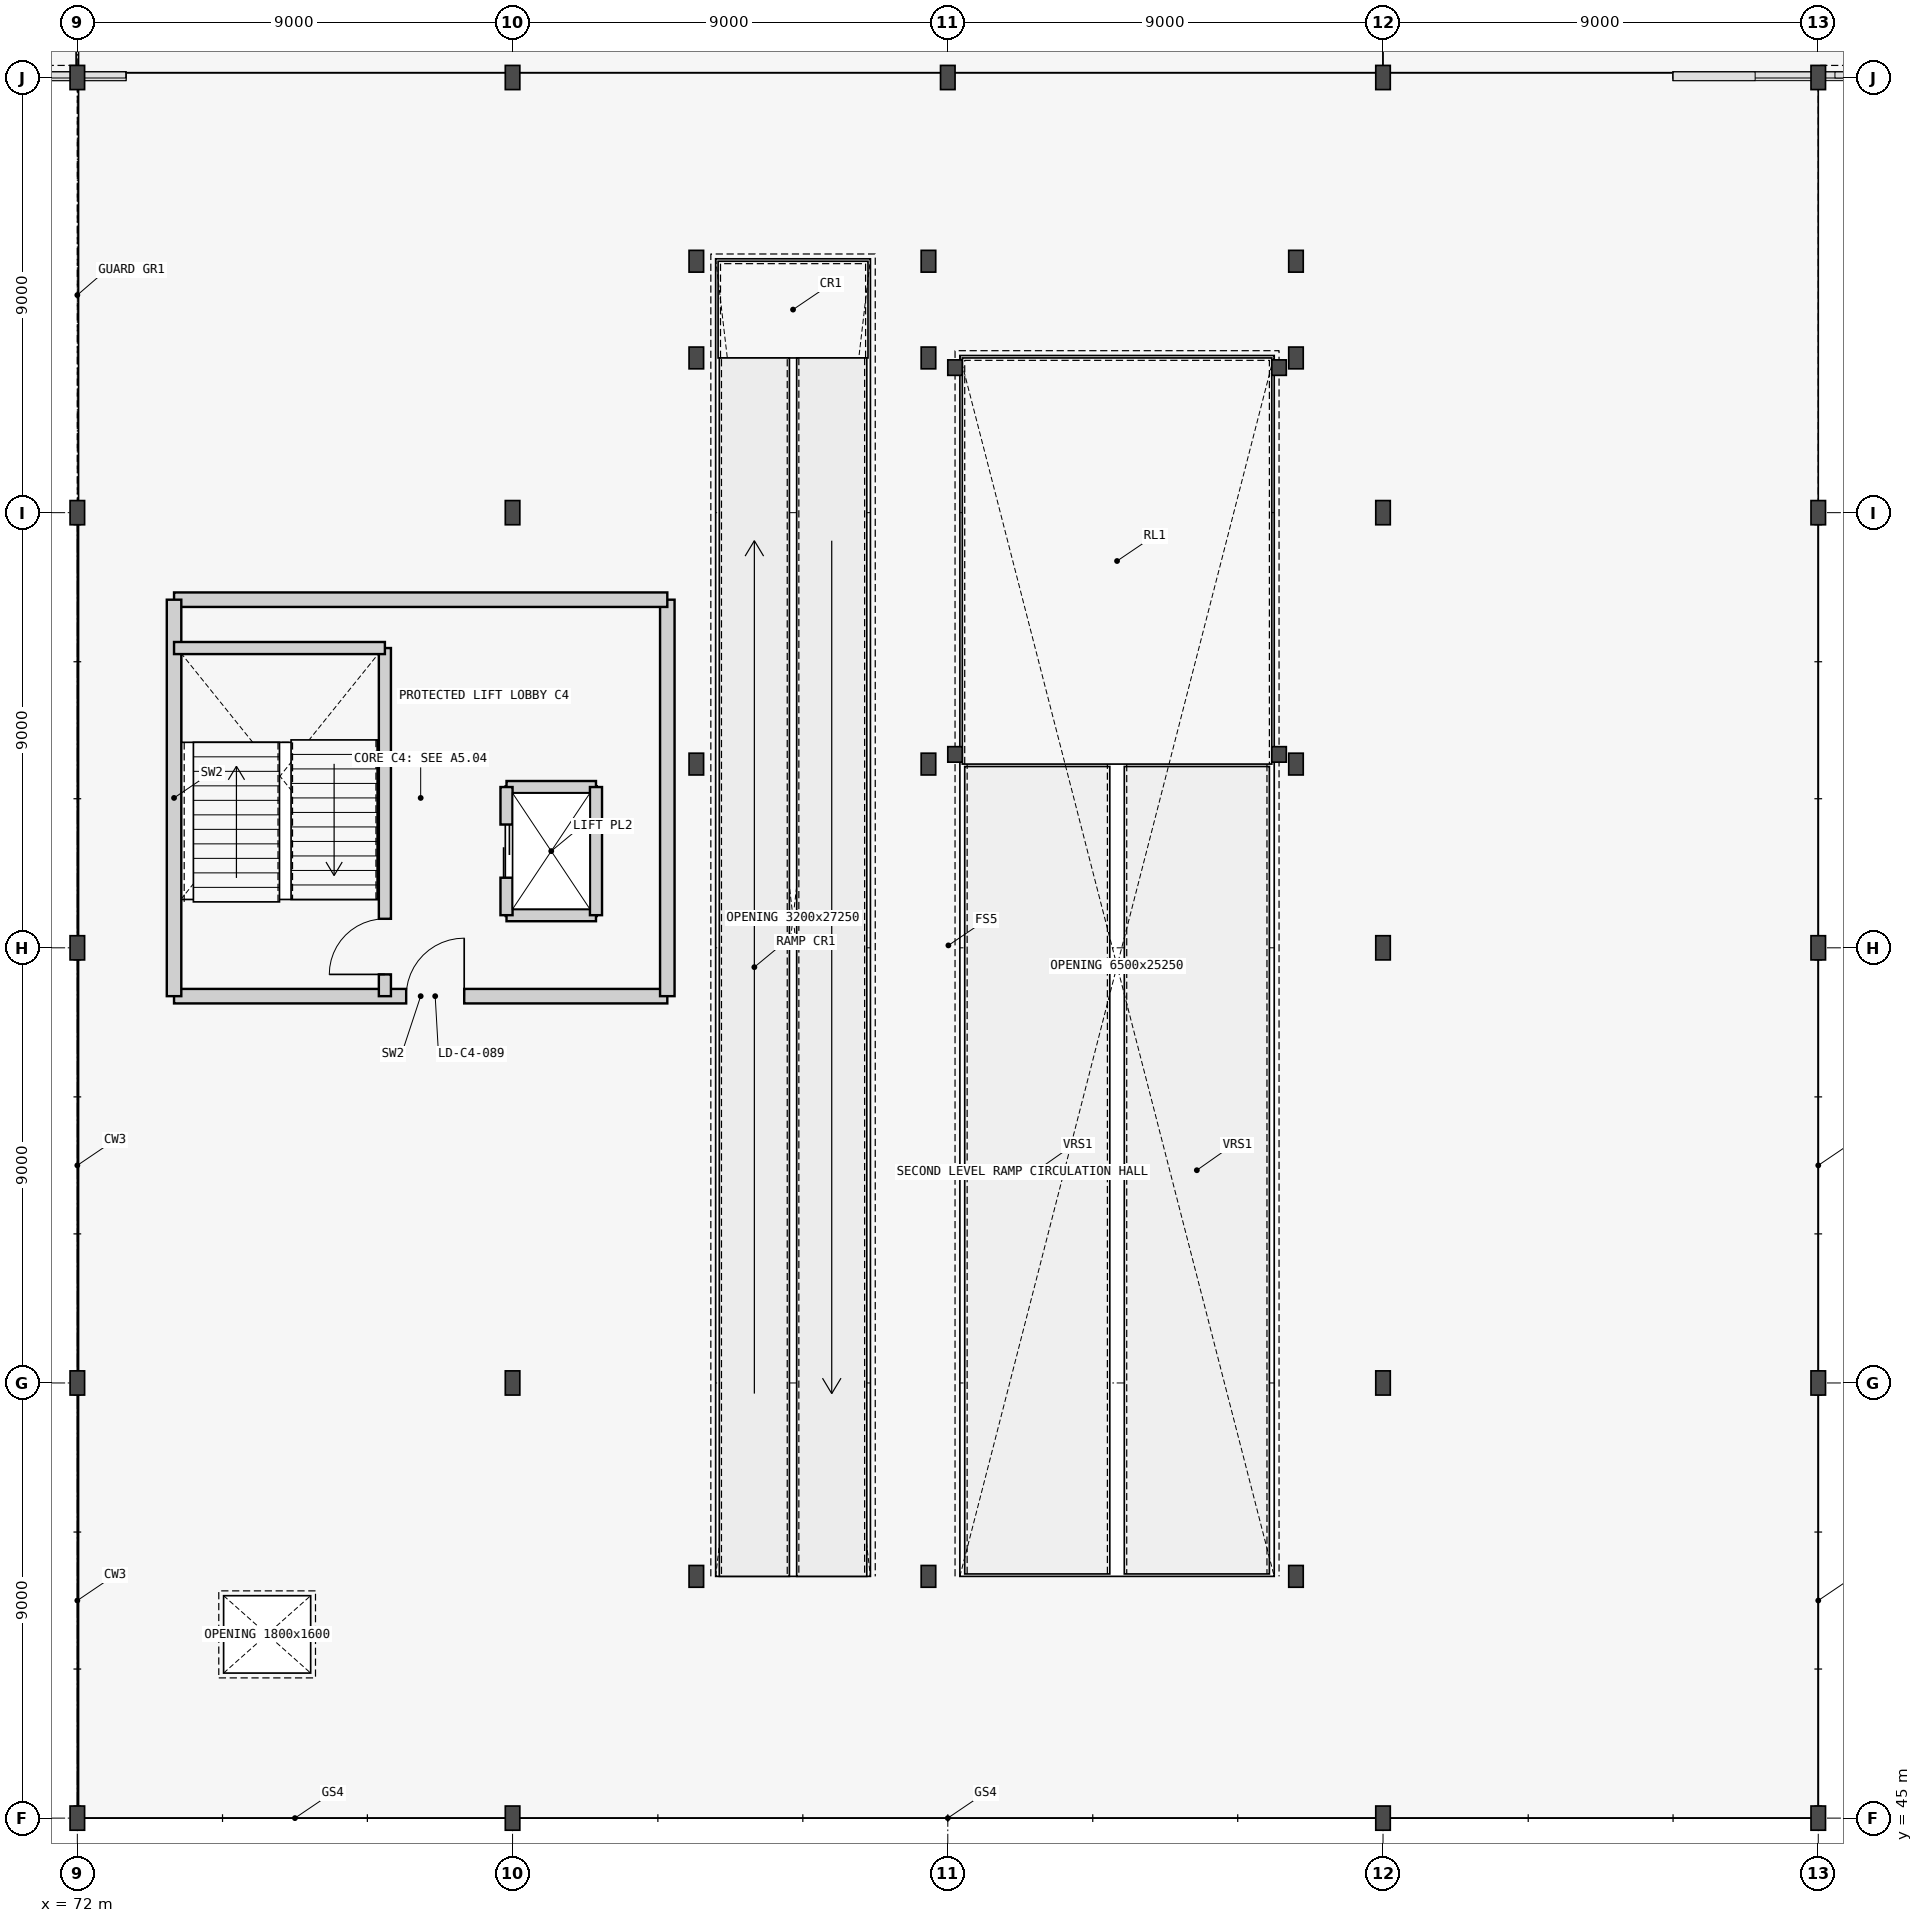
"""IFC4 building model, lengths in metres.
Left out: names, types, materials, properties, quantities, classifications, styles, units other than length and angle.
Written with IfcOpenShell. Run it as: python <this file> out.ifc"""

import sys

from ifc_helpers import new_model, si_unit, direction, frame, frame_2d, origin, origin_2d, place, context, subcontext, project, spatial, rectangle, i_section, extrude, element, fill, save


model = new_model("IFC4")
c1 = context("Model", 3, precision=1e-05, world=origin(), true_north=direction((0.0, 1.0)))
c2 = subcontext(c1, "Body", "Model", "MODEL_VIEW")
j1 = project(units=[si_unit("LENGTHUNIT", "METRE"), si_unit("PLANEANGLEUNIT", "RADIAN")], contexts=[c1])
p1 = place(None, origin())
s1 = spatial("IfcSite", under=j1, at=p1, CompositionType="ELEMENT")
p2 = place(p1, origin())
s2 = spatial("IfcBuilding", under=s1, at=p2, CompositionType="ELEMENT")
p3 = place(p2, frame((0.0, 0.0, 8.4)))
s3 = spatial("IfcBuildingStorey", under=s2, at=p3, CompositionType="ELEMENT", Elevation=8.4)
for number, where, z_axis, x_axis in (
    (1, (72.0, 45.0, 0.0), (0.0, 0.0, 1.0), (1.0, 0.0, 0.0)),
    (2, (72.0, 54.0, 0.0), (0.0, 0.0, 1.0), (1.0, 0.0, 0.0)),
    (3, (72.0, 63.0, 0.0), (0.0, 0.0, 1.0), (1.0, 0.0, 0.0)),
    (4, (72.0, 72.0, 0.0), (0.0, 0.0, 1.0), (1.0, 0.0, 0.0)),
    (5, (72.0, 81.0, 0.0), (0.0, 0.0, 1.0), (1.0, 0.0, 0.0)),
    (6, (81.0, 45.0, 0.0), (0.0, 0.0, 1.0), (1.0, 0.0, 0.0)),
    (7, (81.0, 54.0, 0.0), (0.0, 0.0, 1.0), (1.0, 0.0, 0.0)),
    (8, (81.0, 72.0, 0.0), (0.0, 0.0, 1.0), (1.0, 0.0, 0.0)),
    (9, (81.0, 81.0, 0.0), (0.0, 0.0, 1.0), (1.0, 0.0, 0.0)),
    (10, (99.0, 45.0, 0.0), (0.0, 0.0, 1.0), (1.0, 0.0, 0.0)),
    (11, (99.0, 54.0, 0.0), (0.0, 0.0, 1.0), (1.0, 0.0, 0.0)),
    (12, (99.0, 63.0, 0.0), (0.0, 0.0, 1.0), (1.0, 0.0, 0.0)),
    (13, (99.0, 72.0, 0.0), (0.0, 0.0, 1.0), (1.0, 0.0, 0.0)),
    (14, (99.0, 81.0, 0.0), (0.0, 0.0, 1.0), (1.0, 0.0, 0.0)),
    (15, (108.0, 45.0, 0.0), (0.0, 0.0, 1.0), (1.0, 0.0, 0.0)),
    (16, (108.0, 54.0, 0.0), (0.0, 0.0, 1.0), (1.0, 0.0, 0.0)),
    (17, (108.0, 63.0, 0.0), (0.0, 0.0, 1.0), (1.0, 0.0, 0.0)),
    (18, (108.0, 72.0, 0.0), (0.0, 0.0, 1.0), (1.0, 0.0, 0.0)),
    (19, (108.0, 81.0, 0.0), (0.0, 0.0, 1.0), (1.0, 0.0, 0.0)),
):
    element("IfcColumn", number, at=place(p3, frame(where, z_axis=z_axis, x_axis=x_axis)), inside=s3, PredefinedType="COLUMN", context=c2, shape_type="SweptSolid", body=[
        extrude(i_section(OverallWidth=0.3, OverallDepth=0.5, WebThickness=0.014, FlangeThickness=0.028, FilletRadius=0.027, at=origin_2d()), origin(), (0.0, 0.0, 1.0), 4.2),
    ])
for number, where, z_axis, x_axis in (
    (20, (84.8, 50.0, 0.0), (0.0, 0.0, 1.0), (1.0, 0.0, 0.0)),
    (21, (84.8, 66.8, 0.0), (0.0, 0.0, 1.0), (1.0, 0.0, 0.0)),
    (22, (84.8, 75.2, 0.0), (0.0, 0.0, 1.0), (1.0, 0.0, 0.0)),
    (23, (84.8, 77.2, 0.0), (0.0, 0.0, 1.0), (1.0, 0.0, 0.0)),
    (24, (89.6, 50.0, 0.0), (0.0, 0.0, 1.0), (1.0, 0.0, 0.0)),
    (25, (89.6, 66.8, 0.0), (0.0, 0.0, 1.0), (1.0, 0.0, 0.0)),
    (26, (89.6, 75.2, 0.0), (0.0, 0.0, 1.0), (1.0, 0.0, 0.0)),
    (27, (89.6, 77.2, 0.0), (0.0, 0.0, 1.0), (1.0, 0.0, 0.0)),
    (28, (97.2, 50.0, 0.0), (0.0, 0.0, 1.0), (1.0, 0.0, 0.0)),
    (29, (97.2, 66.8, 0.0), (0.0, 0.0, 1.0), (1.0, 0.0, 0.0)),
    (30, (97.2, 75.2, 0.0), (0.0, 0.0, 1.0), (1.0, 0.0, 0.0)),
    (31, (97.2, 77.2, 0.0), (0.0, 0.0, 1.0), (1.0, 0.0, 0.0)),
):
    element("IfcColumn", number, at=place(p3, frame(where, z_axis=z_axis, x_axis=x_axis)), inside=s3, PredefinedType="COLUMN", context=c2, shape_type="SweptSolid", body=[
        extrude(i_section(OverallWidth=0.3, OverallDepth=0.45, WebThickness=0.014, FlangeThickness=0.026, FilletRadius=0.027, at=origin_2d()), origin(), (0.0, 0.0, 1.0), 4.2),
    ])
p4 = place(p3, frame((90.0, 81.0, 0.0), z_axis=(0.0, 0.0, 1.0), x_axis=(1.0, 0.0, 0.0)))
e32 = element("IfcColumn", 32, at=p4, inside=s3, PredefinedType="COLUMN", context=c2, shape_type="SweptSolid", body=[
    extrude(i_section(OverallWidth=0.3, OverallDepth=0.5, WebThickness=0.014, FlangeThickness=0.028, FilletRadius=0.027, at=origin_2d()), origin(), (0.0, 0.0, 1.0), 4.2),
])
for number, where, z_axis, x_axis in (
    (33, (90.15, 67.0, 0.0), (0.0, 0.0, 1.0), (1.0, 0.0, 0.0)),
    (34, (90.15, 75.0, 0.0), (0.0, 0.0, 1.0), (1.0, 0.0, 0.0)),
    (35, (96.85, 67.0, 0.0), (0.0, 0.0, 1.0), (1.0, 0.0, 0.0)),
    (36, (96.85, 75.0, 0.0), (0.0, 0.0, 1.0), (1.0, 0.0, 0.0)),
):
    element("IfcColumn", number, at=place(p3, frame(where, z_axis=z_axis, x_axis=x_axis)), inside=s3, PredefinedType="COLUMN", context=c2, shape_type="SweptSolid", body=[
        extrude(i_section(OverallWidth=0.3, OverallDepth=0.32, WebThickness=0.011, FlangeThickness=0.021, FilletRadius=0.027, at=origin_2d()), origin(), (0.0, 0.0, 1.0), 4.2),
    ])
p5 = place(p3, frame((74.0, 62.0, 0.0), z_axis=(0.0, 0.0, 1.0), x_axis=(1.0, 0.0, 0.0)))
e37 = element("IfcWall", 37, at=p5, inside=s3, PredefinedType="SHEAR", context=c2, shape_type="SweptSolid", body=[
    extrude(rectangle(XDim=10.2, YDim=0.3, at=frame_2d((5.1, 0.0))), origin(), (0.0, 0.0, 1.0), 3.935),
])
p6 = place(p5, frame((4.8, 0.0, 0.0)))
e38 = element("IfcOpeningElement", 38, at=p6, cuts=e37, PredefinedType="OPENING", context=c2, shape_type="SweptSolid", body=[
    extrude(rectangle(XDim=1.2, YDim=2.15, at=frame_2d((0.6, 1.075))), frame((0.0, 0.16, 0.0), z_axis=(0.0, -1.0, 0.0), x_axis=(1.0, 0.0, 0.0)), (0.0, 0.0, 1.0), 0.32),
])
p7 = place(p3, frame((84.2, 62.0, 0.0), z_axis=(0.0, 0.0, 1.0), x_axis=(0.0, 1.0, 0.0)))
e39 = element("IfcWall", 39, at=p7, inside=s3, PredefinedType="SHEAR", context=c2, shape_type="SweptSolid", body=[
    extrude(rectangle(XDim=8.2, YDim=0.3, at=frame_2d((4.1, 0.0))), origin(), (0.0, 0.0, 1.0), 3.935),
])
p8 = place(p3, frame((84.2, 70.2, 0.0), z_axis=(0.0, 0.0, 1.0), x_axis=(-1.0, 0.0, 0.0)))
e40 = element("IfcWall", 40, at=p8, inside=s3, PredefinedType="SHEAR", context=c2, shape_type="SweptSolid", body=[
    extrude(rectangle(XDim=10.2, YDim=0.3, at=frame_2d((5.1, 0.0))), origin(), (0.0, 0.0, 1.0), 3.935),
])
p9 = place(p3, frame((74.0, 70.2, 0.0), z_axis=(0.0, 0.0, 1.0), x_axis=(0.0, -1.0, 0.0)))
e41 = element("IfcWall", 41, at=p9, inside=s3, PredefinedType="SHEAR", context=c2, shape_type="SweptSolid", body=[
    extrude(rectangle(XDim=8.2, YDim=0.3, at=frame_2d((4.1, 0.0))), origin(), (0.0, 0.0, 1.0), 3.935),
])
p10 = place(p3, frame((78.36, 62.0, 0.0), z_axis=(0.0, 0.0, 1.0), x_axis=(0.0, 1.0, 0.0)))
e42 = element("IfcWall", 42, at=p10, inside=s3, PredefinedType="SHEAR", context=c2, shape_type="SweptSolid", body=[
    extrude(rectangle(XDim=7.2, YDim=0.25, at=frame_2d((3.6, 0.0))), origin(), (0.0, 0.0, 1.0), 3.935),
])
p11 = place(p10, frame((0.45, 0.0, 0.0)))
e43 = element("IfcOpeningElement", 43, at=p11, cuts=e42, PredefinedType="OPENING", context=c2, shape_type="SweptSolid", body=[
    extrude(rectangle(XDim=1.15, YDim=2.15, at=frame_2d((0.575, 1.075))), frame((0.0, 0.135, 0.0), z_axis=(0.0, -1.0, 0.0), x_axis=(1.0, 0.0, 0.0)), (0.0, 0.0, 1.0), 0.27),
])
p12 = place(p3, frame((74.0, 69.2, 0.0), z_axis=(0.0, 0.0, 1.0), x_axis=(1.0, 0.0, 0.0)))
e44 = element("IfcWall", 44, at=p12, inside=s3, PredefinedType="SHEAR", context=c2, shape_type="SweptSolid", body=[
    extrude(rectangle(XDim=4.36, YDim=0.25, at=frame_2d((2.18, 0.0))), origin(), (0.0, 0.0, 1.0), 3.935),
])
for number, where, z_axis, x_axis in (
    (45, (80.875, 63.675, 0.0), (0.0, 0.0, 1.0), (1.0, 0.0, 0.0)),
    (46, (80.875, 66.325, 0.0), (0.0, 0.0, 1.0), (1.0, 0.0, 0.0)),
):
    element("IfcWall", number, at=place(p3, frame(where, z_axis=z_axis, x_axis=x_axis)), inside=s3, PredefinedType="SHEAR", context=c2, shape_type="SweptSolid", body=[
        extrude(rectangle(XDim=1.85, YDim=0.25, at=frame_2d((0.925, 0.0))), origin(), (0.0, 0.0, 1.0), 3.935),
    ])
p13 = place(p3, frame((82.725, 63.675, 0.0), z_axis=(0.0, 0.0, 1.0), x_axis=(0.0, 1.0, 0.0)))
e47 = element("IfcWall", 47, at=p13, inside=s3, PredefinedType="SHEAR", context=c2, shape_type="SweptSolid", body=[
    extrude(rectangle(XDim=2.65, YDim=0.25, at=frame_2d((1.325, 0.0))), origin(), (0.0, 0.0, 1.0), 3.935),
])
p14 = place(p3, frame((80.875, 63.675, 0.0), z_axis=(0.0, 0.0, 1.0), x_axis=(0.0, 1.0, 0.0)))
e48 = element("IfcWall", 48, at=p14, inside=s3, PredefinedType="SHEAR", context=c2, shape_type="SweptSolid", body=[
    extrude(rectangle(XDim=2.65, YDim=0.25, at=frame_2d((1.325, 0.0))), origin(), (0.0, 0.0, 1.0), 3.935),
])
p15 = place(p14, frame((0.775, 0.0, 0.0)))
e49 = element("IfcOpeningElement", 49, at=p15, cuts=e48, PredefinedType="OPENING", context=c2, shape_type="SweptSolid", body=[
    extrude(rectangle(XDim=1.1, YDim=2.15, at=frame_2d((0.55, 1.075))), frame((0.0, 0.135, 0.0), z_axis=(0.0, -1.0, 0.0), x_axis=(1.0, 0.0, 0.0)), (0.0, 0.0, 1.0), 0.27),
])
p16 = place(p11, origin())
e50 = element("IfcDoor", 50, at=p16, inside=s3, OperationType="SINGLE_SWING_LEFT", PredefinedType="DOOR", context=c2, shape_type="SweptSolid", body=[
    extrude(rectangle(XDim=1.15, YDim=2.15, at=frame_2d((0.575, 1.075))), frame((0.0, 0.025, 0.0), z_axis=(0.0, -1.0, 0.0), x_axis=(1.0, 0.0, 0.0)), (0.0, 0.0, 1.0), 0.05),
])
fill(e43, e50)
p17 = place(p6, origin())
e51 = element("IfcDoor", 51, at=p17, inside=s3, OperationType="SINGLE_SWING_RIGHT", PredefinedType="DOOR", context=c2, shape_type="SweptSolid", body=[
    extrude(rectangle(XDim=1.2, YDim=2.15, at=frame_2d((0.6, 1.075))), frame((0.0, 0.025, 0.0), z_axis=(0.0, -1.0, 0.0), x_axis=(1.0, 0.0, 0.0)), (0.0, 0.0, 1.0), 0.05),
])
fill(e38, e51)
p18 = place(p15, origin())
e52 = element("IfcDoor", 52, at=p18, inside=s3, OperationType="DOUBLE_DOOR_SLIDING", PredefinedType="USERDEFINED", context=c2, shape_type="SweptSolid", body=[
    extrude(rectangle(XDim=1.1, YDim=2.15, at=frame_2d((0.55, 1.075))), frame((0.0, 0.025, 0.0), z_axis=(0.0, -1.0, 0.0), x_axis=(1.0, 0.0, 0.0)), (0.0, 0.0, 1.0), 0.05),
])
fill(e49, e52)
save(model, sys.argv[1])
